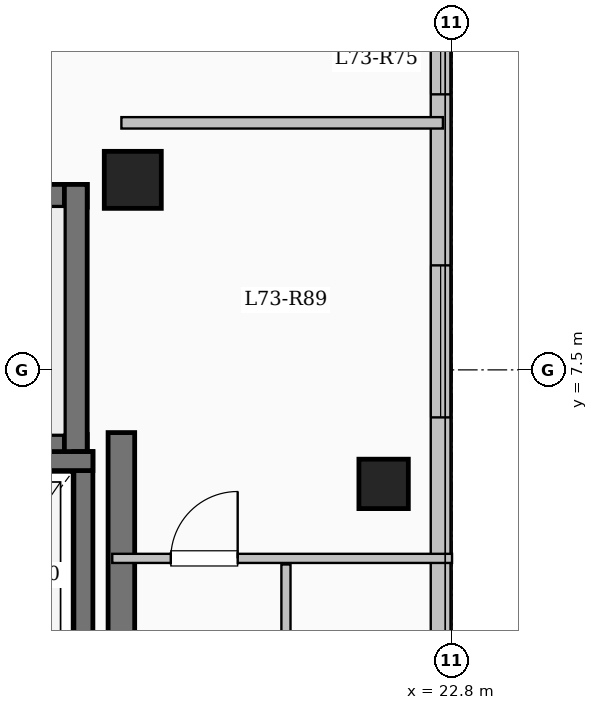
"""IFC4 building model, lengths in metres.
Left out: names, types, materials, properties, quantities, classifications, styles, units other than length and angle.
Written with IfcOpenShell. Run it as: python <this file> out.ifc"""

import sys

from ifc_helpers import new_model, si_unit, direction, frame, frame_2d, origin, origin_2d, place, context, subcontext, project, spatial, rectangle, extrude, element, fill, save


model = new_model("IFC4")
c1 = context("Model", 3, precision=1e-05, world=origin(), true_north=direction((0.0, 1.0)))
c2 = subcontext(c1, "Body", "Model", "MODEL_VIEW")
j1 = project(units=[si_unit("LENGTHUNIT", "METRE"), si_unit("PLANEANGLEUNIT", "RADIAN")], contexts=[c1])
p1 = place(None, origin())
s1 = spatial("IfcSite", under=j1, at=p1, CompositionType="ELEMENT")
p2 = place(p1, origin())
s2 = spatial("IfcBuilding", under=s1, at=p2, CompositionType="ELEMENT")
p3 = place(p2, frame((0.0, 0.0, 268.3)))
s3 = spatial("IfcBuildingStorey", under=s2, at=p3, CompositionType="ELEMENT", Elevation=268.3)
p4 = place(p3, frame((18.6, 10.0, 0.0), z_axis=(0.0, 0.0, 1.0), x_axis=(1.0, 0.0, 0.0)))
e1 = element("IfcColumn", 1, at=p4, inside=s3, PredefinedType="COLUMN", context=c2, shape_type="SweptSolid", body=[
    extrude(rectangle(XDim=0.75, YDim=0.75, at=origin_2d()), origin(), (0.0, 0.0, 1.0), 3.35),
])
p5 = place(p3, frame((21.9, 6.0, 0.0), z_axis=(0.0, 0.0, 1.0), x_axis=(1.0, 0.0, 0.0)))
e2 = element("IfcColumn", 2, at=p5, inside=s3, PredefinedType="COLUMN", context=c2, shape_type="SweptSolid", body=[
    extrude(rectangle(XDim=0.65, YDim=0.65, at=origin_2d()), origin(), (0.0, 0.0, 1.0), 3.35),
])
p6 = place(p3, frame((22.65, 17.55, 0.0), z_axis=(0.0, 0.0, 1.0), x_axis=(0.0, -1.0, 0.0)))
e3 = element("IfcWall", 3, at=p6, inside=s3, PredefinedType="SOLIDWALL", context=c2, shape_type="SweptSolid", body=[
    extrude(rectangle(XDim=35.1, YDim=0.26, at=frame_2d((17.55, 0.0))), origin(), (0.0, 0.0, 1.0), 3.05),
])
p7 = place(p6, frame((1.525, 0.0, 0.9)))
e4 = element("IfcOpeningElement", 4, at=p7, cuts=e3, PredefinedType="OPENING", context=c2, shape_type="SweptSolid", body=[
    extrude(rectangle(XDim=2.0, YDim=1.7, at=frame_2d((1.0, 0.85))), frame((0.0, 0.14, 0.0), z_axis=(0.0, -1.0, 0.0), x_axis=(1.0, 0.0, 0.0)), (0.0, 0.0, 1.0), 0.28),
])
p8 = place(p6, frame((5.425, 0.0, 0.95)))
e5 = element("IfcOpeningElement", 5, at=p8, cuts=e3, PredefinedType="OPENING", context=c2, shape_type="SweptSolid", body=[
    extrude(rectangle(XDim=1.0, YDim=1.5, at=frame_2d((0.5, 0.75))), frame((0.0, 0.14, 0.0), z_axis=(0.0, -1.0, 0.0), x_axis=(1.0, 0.0, 0.0)), (0.0, 0.0, 1.0), 0.28),
])
p9 = place(p6, frame((8.675, 0.0, 0.9)))
e6 = element("IfcOpeningElement", 6, at=p9, cuts=e3, PredefinedType="OPENING", context=c2, shape_type="SweptSolid", body=[
    extrude(rectangle(XDim=2.0, YDim=1.7, at=frame_2d((1.0, 0.85))), frame((0.0, 0.14, 0.0), z_axis=(0.0, -1.0, 0.0), x_axis=(1.0, 0.0, 0.0)), (0.0, 0.0, 1.0), 0.28),
])
p10 = place(p6, frame((13.5, 0.0, 0.9)))
e7 = element("IfcOpeningElement", 7, at=p10, cuts=e3, PredefinedType="OPENING", context=c2, shape_type="SweptSolid", body=[
    extrude(rectangle(XDim=1.65, YDim=1.6, at=frame_2d((0.825, 0.8))), frame((0.0, 0.14, 0.0), z_axis=(0.0, -1.0, 0.0), x_axis=(1.0, 0.0, 0.0)), (0.0, 0.0, 1.0), 0.28),
])
p11 = place(p6, frame((19.35, 0.0, 0.9)))
e8 = element("IfcOpeningElement", 8, at=p11, cuts=e3, PredefinedType="OPENING", context=c2, shape_type="SweptSolid", body=[
    extrude(rectangle(XDim=2.2, YDim=1.75, at=frame_2d((1.1, 0.875))), frame((0.0, 0.14, 0.0), z_axis=(0.0, -1.0, 0.0), x_axis=(1.0, 0.0, 0.0)), (0.0, 0.0, 1.0), 0.28),
])
p12 = place(p6, frame((25.275, 0.0, 0.95)))
e9 = element("IfcOpeningElement", 9, at=p12, cuts=e3, PredefinedType="OPENING", context=c2, shape_type="SweptSolid", body=[
    extrude(rectangle(XDim=1.2, YDim=1.5, at=frame_2d((0.6, 0.75))), frame((0.0, 0.14, 0.0), z_axis=(0.0, -1.0, 0.0), x_axis=(1.0, 0.0, 0.0)), (0.0, 0.0, 1.0), 0.28),
])
p13 = place(p6, frame((29.925, 0.0, 0.9)))
e10 = element("IfcOpeningElement", 10, at=p13, cuts=e3, PredefinedType="OPENING", context=c2, shape_type="SweptSolid", body=[
    extrude(rectangle(XDim=2.2, YDim=1.75, at=frame_2d((1.1, 0.875))), frame((0.0, 0.14, 0.0), z_axis=(0.0, -1.0, 0.0), x_axis=(1.0, 0.0, 0.0)), (0.0, 0.0, 1.0), 0.28),
])
p14 = place(p3, frame((10.0, 9.79, 0.0), z_axis=(0.0, 0.0, 1.0), x_axis=(1.0, 0.0, 0.0)))
e11 = element("IfcWall", 11, at=p14, inside=s3, PredefinedType="SHEAR", context=c2, shape_type="SweptSolid", body=[
    extrude(rectangle(XDim=8.0, YDim=0.3, at=frame_2d((4.0, 0.0))), origin(), (0.0, 0.0, 1.0), 3.35),
])
p15 = place(p3, frame((10.0, 6.5, 0.0), z_axis=(0.0, 0.0, 1.0), x_axis=(1.0, 0.0, 0.0)))
e12 = element("IfcWall", 12, at=p15, inside=s3, PredefinedType="SHEAR", context=c2, shape_type="SweptSolid", body=[
    extrude(rectangle(XDim=8.0, YDim=0.3, at=frame_2d((4.0, 0.0))), origin(), (0.0, 0.0, 1.0), 3.35),
])
p16 = place(p15, frame((0.55, 0.0, 0.0)))
e13 = element("IfcOpeningElement", 13, at=p16, cuts=e12, PredefinedType="OPENING", context=c2, shape_type="SweptSolid", body=[
    extrude(rectangle(XDim=1.0, YDim=2.15, at=frame_2d((0.5, 1.075))), frame((0.0, 0.16, 0.0), z_axis=(0.0, -1.0, 0.0), x_axis=(1.0, 0.0, 0.0)), (0.0, 0.0, 1.0), 0.32),
])
p17 = place(p3, frame((17.85, 6.35, 0.0), z_axis=(0.0, 0.0, 1.0), x_axis=(0.0, 1.0, 0.0)))
e14 = element("IfcWall", 14, at=p17, inside=s3, PredefinedType="SHEAR", context=c2, shape_type="SweptSolid", body=[
    extrude(rectangle(XDim=3.59, YDim=0.3, at=frame_2d((1.795, 0.0))), origin(), (0.0, 0.0, 1.0), 3.35),
])
p18 = place(p3, frame((17.95, 3.175, 0.0), z_axis=(0.0, 0.0, 1.0), x_axis=(0.0, 1.0, 0.0)))
e15 = element("IfcWall", 15, at=p18, inside=s3, PredefinedType="SHEAR", context=c2, shape_type="SweptSolid", body=[
    extrude(rectangle(XDim=3.25, YDim=0.25, at=frame_2d((1.625, 0.0))), origin(), (0.0, 0.0, 1.0), 3.35),
])
p19 = place(p3, frame((15.525, 6.3, 0.0), z_axis=(0.0, 0.0, 1.0), x_axis=(1.0, 0.0, 0.0)))
e16 = element("IfcWall", 16, at=p19, inside=s3, PredefinedType="SHEAR", context=c2, shape_type="SweptSolid", body=[
    extrude(rectangle(XDim=2.55, YDim=0.25, at=frame_2d((1.275, 0.0))), origin(), (0.0, 0.0, 1.0), 3.35),
])
p20 = place(p3, frame((18.45, -7.375, 0.0), z_axis=(0.0, 0.0, 1.0), x_axis=(0.0, 1.0, 0.0)))
e17 = element("IfcWall", 17, at=p20, inside=s3, PredefinedType="SHEAR", context=c2, shape_type="SweptSolid", body=[
    extrude(rectangle(XDim=14.05, YDim=0.35, at=frame_2d((7.025, 0.0))), origin(), (0.0, 0.0, 1.0), 3.35),
])
p21 = place(p3, frame((18.45, 10.75, 0.0), z_axis=(0.0, 0.0, 1.0), x_axis=(1.0, 0.0, 0.0)))
e18 = element("IfcWall", 18, at=p21, inside=s3, PredefinedType="PARTITIONING", context=c2, shape_type="SweptSolid", body=[
    extrude(rectangle(XDim=4.23, YDim=0.15, at=frame_2d((2.115, 0.0))), origin(), (0.0, 0.0, 1.0), 3.05),
])
p22 = place(p3, frame((18.33, 5.02, 0.0), z_axis=(0.0, 0.0, 1.0), x_axis=(1.0, 0.0, 0.0)))
e19 = element("IfcWall", 19, at=p22, inside=s3, PredefinedType="PARTITIONING", context=c2, shape_type="SweptSolid", body=[
    extrude(rectangle(XDim=4.47, YDim=0.12, at=frame_2d((2.235, 0.0))), origin(), (0.0, 0.0, 1.0), 3.05),
])
p23 = place(p22, frame((0.77, 0.0, 0.0)))
e20 = element("IfcOpeningElement", 20, at=p23, cuts=e19, PredefinedType="OPENING", context=c2, shape_type="SweptSolid", body=[
    extrude(rectangle(XDim=0.88, YDim=2.1, at=frame_2d((0.44, 1.05))), frame((0.0, 0.07, 0.0), z_axis=(0.0, -1.0, 0.0), x_axis=(1.0, 0.0, 0.0)), (0.0, 0.0, 1.0), 0.14),
])
p24 = place(p3, frame((20.615, 1.36, 0.0), z_axis=(0.0, 0.0, 1.0), x_axis=(0.0, 1.0, 0.0)))
e21 = element("IfcWall", 21, at=p24, inside=s3, PredefinedType="PARTITIONING", context=c2, shape_type="SweptSolid", body=[
    extrude(rectangle(XDim=3.58, YDim=0.12, at=frame_2d((1.79, 0.0))), origin(), (0.0, 0.0, 1.0), 3.05),
])
p25 = place(p8, origin())
e22 = element("IfcWindow", 22, at=p25, inside=s3, PartitioningType="SINGLE_PANEL", PredefinedType="WINDOW", context=c2, shape_type="SweptSolid", body=[
    extrude(rectangle(XDim=1.0, YDim=1.5, at=frame_2d((0.5, 0.75))), frame((0.0, 0.03, 0.0), z_axis=(0.0, -1.0, 0.0), x_axis=(1.0, 0.0, 0.0)), (0.0, 0.0, 1.0), 0.06),
])
fill(e5, e22)
p26 = place(p9, origin())
e23 = element("IfcWindow", 23, at=p26, inside=s3, PartitioningType="SINGLE_PANEL", PredefinedType="WINDOW", context=c2, shape_type="SweptSolid", body=[
    extrude(rectangle(XDim=2.0, YDim=1.7, at=frame_2d((1.0, 0.85))), frame((0.0, 0.03, 0.0), z_axis=(0.0, -1.0, 0.0), x_axis=(1.0, 0.0, 0.0)), (0.0, 0.0, 1.0), 0.06),
])
fill(e6, e23)
p27 = place(p23, origin())
e24 = element("IfcDoor", 24, at=p27, inside=s3, OperationType="SINGLE_SWING_RIGHT", PredefinedType="DOOR", context=c2, shape_type="SweptSolid", body=[
    extrude(rectangle(XDim=0.88, YDim=2.1, at=frame_2d((0.44, 1.05))), frame((0.0, 0.025, 0.0), z_axis=(0.0, -1.0, 0.0), x_axis=(1.0, 0.0, 0.0)), (0.0, 0.0, 1.0), 0.05),
])
fill(e20, e24)
save(model, sys.argv[1])
